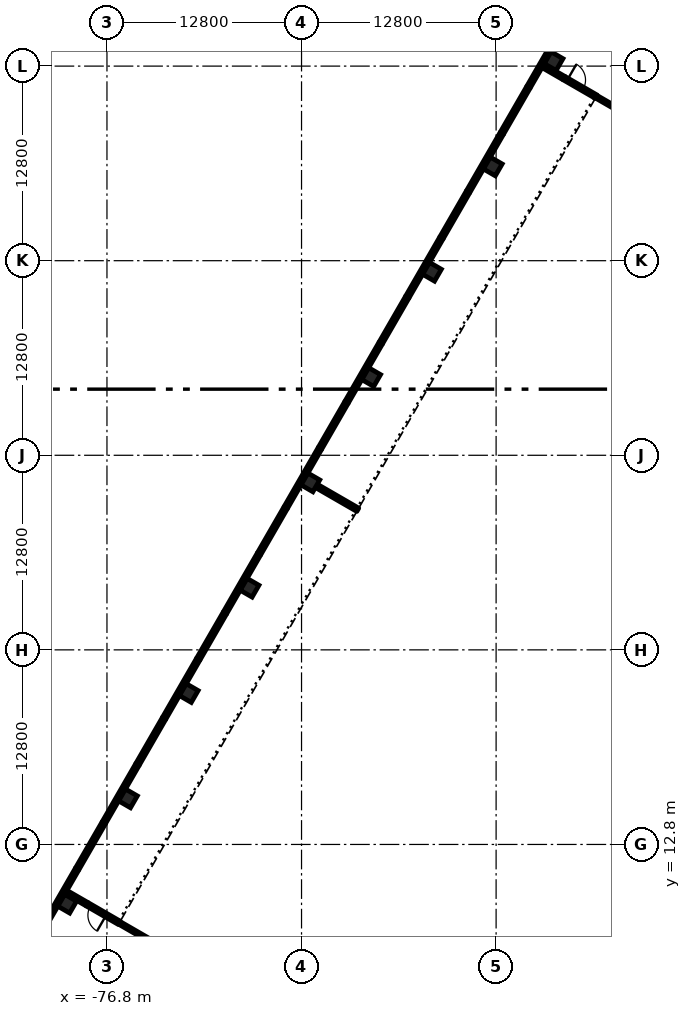
"""IFC4 building model, lengths in metres.
Left out: names, types, materials, properties, quantities, classifications, styles, units other than length and angle.
Written with IfcOpenShell. Run it as: python <this file> out.ifc"""

import sys

from ifc_helpers import new_model, si_unit, direction, frame, frame_2d, origin, origin_2d, place, context, subcontext, project, spatial, rectangle, extrude, element, fill, save


model = new_model("IFC4")
c1 = context("Model", 3, precision=1e-05, world=origin(), true_north=direction((0.0, 1.0)))
c2 = subcontext(c1, "Body", "Model", "MODEL_VIEW")
j1 = project(units=[si_unit("LENGTHUNIT", "METRE"), si_unit("PLANEANGLEUNIT", "RADIAN")], contexts=[c1])
p1 = place(None, origin())
s1 = spatial("IfcSite", under=j1, at=p1, CompositionType="ELEMENT")
p2 = place(p1, origin())
s2 = spatial("IfcBuilding", under=s1, at=p2, CompositionType="ELEMENT")
p3 = place(p2, frame((0.0, 0.0, 11.4)))
s3 = spatial("IfcBuildingStorey", under=s2, at=p3, CompositionType="ELEMENT", Elevation=11.4)
for number, where, z_axis, x_axis in (
    (1, (-47.417, 64.327, 0.0), (0.0, 0.0, 1.0), (-0.5, -0.866, 0.0)),
    (2, (-51.417, 57.399, 0.0), (0.0, 0.0, 1.0), (-0.5, -0.866, 0.0)),
    (3, (-55.417, 50.47, 0.0), (0.0, 0.0, 1.0), (-0.5, -0.866, 0.0)),
    (4, (-59.417, 43.542, 0.0), (0.0, 0.0, 1.0), (-0.5, -0.866, 0.0)),
    (5, (-63.417, 36.614, 0.0), (0.0, 0.0, 1.0), (-0.5, -0.866, 0.0)),
    (6, (-67.417, 29.686, 0.0), (0.0, 0.0, 1.0), (-0.5, -0.866, 0.0)),
    (7, (-71.417, 22.758, 0.0), (0.0, 0.0, 1.0), (-0.5, -0.866, 0.0)),
    (8, (-75.417, 15.829, 0.0), (0.0, 0.0, 1.0), (-0.5, -0.866, 0.0)),
    (9, (-79.417, 8.901, 0.0), (0.0, 0.0, 1.0), (-0.5, -0.866, 0.0)),
):
    element("IfcColumn", number, at=place(p3, frame(where, z_axis=z_axis, x_axis=x_axis)), inside=s3, PredefinedType="COLUMN", context=c2, shape_type="SweptSolid", body=[
        extrude(rectangle(XDim=0.9, YDim=0.9, at=origin_2d()), origin(), (0.0, 0.0, 1.0), 4.8),
    ])
p4 = place(p3, frame((-49.071, 62.612, 0.0), z_axis=(0.0, 0.0, 1.0), x_axis=(0.500001855621, 0.866024332438, 0.0)))
e10 = element("IfcWall", 10, at=p4, inside=s3, PredefinedType="SOLIDWALL", context=c2, shape_type="SweptSolid", body=[
    extrude(rectangle(XDim=10.312, YDim=0.25, at=frame_2d((5.156, 0.0))), origin(), (0.0, 0.0, 1.0), 4.5),
])
p5 = place(p3, frame((-50.821, 59.581, 0.0), z_axis=(0.0, 0.0, 1.0), x_axis=(0.500010275428, 0.866019471182, 0.0)))
e11 = element("IfcWall", 11, at=p5, inside=s3, PredefinedType="SOLIDWALL", context=c2, shape_type="SweptSolid", body=[
    extrude(rectangle(XDim=3.5, YDim=0.25, at=frame_2d((1.75, 0.0))), origin(), (0.0, 0.0, 1.0), 4.5),
])
p6 = place(p5, frame((0.25, 0.0, 0.9)))
e12 = element("IfcOpeningElement", 12, at=p6, cuts=e11, PredefinedType="OPENING", context=c2, shape_type="SweptSolid", body=[
    extrude(rectangle(XDim=3.0, YDim=2.2, at=frame_2d((1.5, 1.1))), frame((0.0, 0.135, 0.0), z_axis=(0.0, -1.0, 0.0), x_axis=(1.0, 0.0, 0.0)), (0.0, 0.0, 1.0), 0.27),
])
p7 = place(p3, frame((-53.04, 55.738, 0.0), z_axis=(0.0, 0.0, 1.0), x_axis=(0.499990705068, 0.866030770149, 0.0)))
e13 = element("IfcWall", 13, at=p7, inside=s3, PredefinedType="SOLIDWALL", context=c2, shape_type="SweptSolid", body=[
    extrude(rectangle(XDim=4.438, YDim=0.25, at=frame_2d((2.219, 0.0))), origin(), (0.0, 0.0, 1.0), 4.5),
])
p8 = place(p3, frame((-54.79, 52.706, 0.0), z_axis=(0.0, 0.0, 1.0), x_axis=(0.499980071345, 0.866036909293, 0.0)))
e14 = element("IfcWall", 14, at=p8, inside=s3, PredefinedType="SOLIDWALL", context=c2, shape_type="SweptSolid", body=[
    extrude(rectangle(XDim=3.5, YDim=0.25, at=frame_2d((1.75, 0.0))), origin(), (0.0, 0.0, 1.0), 4.5),
])
p9 = place(p8, frame((0.25, 0.0, 0.9)))
e15 = element("IfcOpeningElement", 15, at=p9, cuts=e14, PredefinedType="OPENING", context=c2, shape_type="SweptSolid", body=[
    extrude(rectangle(XDim=3.0, YDim=2.2, at=frame_2d((1.5, 1.1))), frame((0.0, 0.135, 0.0), z_axis=(0.0, -1.0, 0.0), x_axis=(1.0, 0.0, 0.0)), (0.0, 0.0, 1.0), 0.27),
])
p10 = place(p3, frame((-57.04, 48.809, 0.0), z_axis=(0.0, 0.0, 1.0), x_axis=(0.500013631625, 0.866017533419, 0.0)))
e16 = element("IfcWall", 16, at=p10, inside=s3, PredefinedType="SOLIDWALL", context=c2, shape_type="SweptSolid", body=[
    extrude(rectangle(XDim=4.5, YDim=0.25, at=frame_2d((2.25, 0.0))), origin(), (0.0, 0.0, 1.0), 4.5),
])
p11 = place(p3, frame((-58.79, 45.778, 0.0), z_axis=(0.0, 0.0, 1.0), x_axis=(0.500010275428, 0.866019471182, 0.0)))
e17 = element("IfcWall", 17, at=p11, inside=s3, PredefinedType="SOLIDWALL", context=c2, shape_type="SweptSolid", body=[
    extrude(rectangle(XDim=3.5, YDim=0.25, at=frame_2d((1.75, 0.0))), origin(), (0.0, 0.0, 1.0), 4.5),
])
p12 = place(p11, frame((0.25, 0.0, 0.9)))
e18 = element("IfcOpeningElement", 18, at=p12, cuts=e17, PredefinedType="OPENING", context=c2, shape_type="SweptSolid", body=[
    extrude(rectangle(XDim=3.0, YDim=2.2, at=frame_2d((1.5, 1.1))), frame((0.0, 0.135, 0.0), z_axis=(0.0, -1.0, 0.0), x_axis=(1.0, 0.0, 0.0)), (0.0, 0.0, 1.0), 0.27),
])
p13 = place(p3, frame((-61.04, 41.881, 0.0), z_axis=(0.0, 0.0, 1.0), x_axis=(0.499990139034, 0.866031096941, 0.0)))
e19 = element("IfcWall", 19, at=p13, inside=s3, PredefinedType="SOLIDWALL", context=c2, shape_type="SweptSolid", body=[
    extrude(rectangle(XDim=4.5, YDim=0.25, at=frame_2d((2.25, 0.0))), origin(), (0.0, 0.0, 1.0), 4.5),
])
p14 = place(p3, frame((-62.79, 38.85, 0.0), z_axis=(0.0, 0.0, 1.0), x_axis=(0.500010275428, 0.866019471182, 0.0)))
e20 = element("IfcWall", 20, at=p14, inside=s3, PredefinedType="SOLIDWALL", context=c2, shape_type="SweptSolid", body=[
    extrude(rectangle(XDim=3.5, YDim=0.25, at=frame_2d((1.75, 0.0))), origin(), (0.0, 0.0, 1.0), 4.5),
])
p15 = place(p14, frame((0.25, 0.0, 0.9)))
e21 = element("IfcOpeningElement", 21, at=p15, cuts=e20, PredefinedType="OPENING", context=c2, shape_type="SweptSolid", body=[
    extrude(rectangle(XDim=3.0, YDim=2.2, at=frame_2d((1.5, 1.1))), frame((0.0, 0.135, 0.0), z_axis=(0.0, -1.0, 0.0), x_axis=(1.0, 0.0, 0.0)), (0.0, 0.0, 1.0), 0.27),
])
p16 = place(p3, frame((-65.04, 34.953, 0.0), z_axis=(0.0, 0.0, 1.0), x_axis=(0.499990139034, 0.866031096941, 0.0)))
e22 = element("IfcWall", 22, at=p16, inside=s3, PredefinedType="SOLIDWALL", context=c2, shape_type="SweptSolid", body=[
    extrude(rectangle(XDim=4.5, YDim=0.25, at=frame_2d((2.25, 0.0))), origin(), (0.0, 0.0, 1.0), 4.5),
])
p17 = place(p3, frame((-66.79, 31.922, 0.0), z_axis=(0.0, 0.0, 1.0), x_axis=(0.500010275428, 0.866019471182, 0.0)))
e23 = element("IfcWall", 23, at=p17, inside=s3, PredefinedType="SOLIDWALL", context=c2, shape_type="SweptSolid", body=[
    extrude(rectangle(XDim=3.5, YDim=0.25, at=frame_2d((1.75, 0.0))), origin(), (0.0, 0.0, 1.0), 4.5),
])
p18 = place(p17, frame((0.25, 0.0, 0.9)))
e24 = element("IfcOpeningElement", 24, at=p18, cuts=e23, PredefinedType="OPENING", context=c2, shape_type="SweptSolid", body=[
    extrude(rectangle(XDim=3.0, YDim=2.2, at=frame_2d((1.5, 1.1))), frame((0.0, 0.135, 0.0), z_axis=(0.0, -1.0, 0.0), x_axis=(1.0, 0.0, 0.0)), (0.0, 0.0, 1.0), 0.27),
])
p19 = place(p3, frame((-69.04, 28.025, 0.0), z_axis=(0.0, 0.0, 1.0), x_axis=(0.499990139034, 0.866031096941, 0.0)))
e25 = element("IfcWall", 25, at=p19, inside=s3, PredefinedType="SOLIDWALL", context=c2, shape_type="SweptSolid", body=[
    extrude(rectangle(XDim=4.5, YDim=0.25, at=frame_2d((2.25, 0.0))), origin(), (0.0, 0.0, 1.0), 4.5),
])
p20 = place(p3, frame((-70.79, 24.994, 0.0), z_axis=(0.0, 0.0, 1.0), x_axis=(0.500010275428, 0.866019471182, 0.0)))
e26 = element("IfcWall", 26, at=p20, inside=s3, PredefinedType="SOLIDWALL", context=c2, shape_type="SweptSolid", body=[
    extrude(rectangle(XDim=3.5, YDim=0.25, at=frame_2d((1.75, 0.0))), origin(), (0.0, 0.0, 1.0), 4.5),
])
p21 = place(p20, frame((0.25, 0.0, 0.9)))
e27 = element("IfcOpeningElement", 27, at=p21, cuts=e26, PredefinedType="OPENING", context=c2, shape_type="SweptSolid", body=[
    extrude(rectangle(XDim=3.0, YDim=2.2, at=frame_2d((1.5, 1.1))), frame((0.0, 0.135, 0.0), z_axis=(0.0, -1.0, 0.0), x_axis=(1.0, 0.0, 0.0)), (0.0, 0.0, 1.0), 0.27),
])
p22 = place(p3, frame((-73.04, 21.096, 0.0), z_axis=(0.0, 0.0, 1.0), x_axis=(0.499990139034, 0.866031096941, 0.0)))
e28 = element("IfcWall", 28, at=p22, inside=s3, PredefinedType="SOLIDWALL", context=c2, shape_type="SweptSolid", body=[
    extrude(rectangle(XDim=4.5, YDim=0.25, at=frame_2d((2.25, 0.0))), origin(), (0.0, 0.0, 1.0), 4.5),
])
p23 = place(p3, frame((-74.79, 18.065, 0.0), z_axis=(0.0, 0.0, 1.0), x_axis=(0.500010275428, 0.866019471182, 0.0)))
e29 = element("IfcWall", 29, at=p23, inside=s3, PredefinedType="SOLIDWALL", context=c2, shape_type="SweptSolid", body=[
    extrude(rectangle(XDim=3.5, YDim=0.25, at=frame_2d((1.75, 0.0))), origin(), (0.0, 0.0, 1.0), 4.5),
])
p24 = place(p23, frame((0.25, 0.0, 0.9)))
e30 = element("IfcOpeningElement", 30, at=p24, cuts=e29, PredefinedType="OPENING", context=c2, shape_type="SweptSolid", body=[
    extrude(rectangle(XDim=3.0, YDim=2.2, at=frame_2d((1.5, 1.1))), frame((0.0, 0.135, 0.0), z_axis=(0.0, -1.0, 0.0), x_axis=(1.0, 0.0, 0.0)), (0.0, 0.0, 1.0), 0.27),
])
p25 = place(p3, frame((-77.009, 14.222, 0.0), z_axis=(0.0, 0.0, 1.0), x_axis=(0.499990705068, 0.866030770149, 0.0)))
e31 = element("IfcWall", 31, at=p25, inside=s3, PredefinedType="SOLIDWALL", context=c2, shape_type="SweptSolid", body=[
    extrude(rectangle(XDim=4.438, YDim=0.25, at=frame_2d((2.219, 0.0))), origin(), (0.0, 0.0, 1.0), 4.5),
])
p26 = place(p3, frame((-78.759, 11.191, 0.0), z_axis=(0.0, 0.0, 1.0), x_axis=(0.500010275428, 0.866019471182, 0.0)))
e32 = element("IfcWall", 32, at=p26, inside=s3, PredefinedType="SOLIDWALL", context=c2, shape_type="SweptSolid", body=[
    extrude(rectangle(XDim=3.5, YDim=0.25, at=frame_2d((1.75, 0.0))), origin(), (0.0, 0.0, 1.0), 4.5),
])
p27 = place(p26, frame((0.25, 0.0, 0.9)))
e33 = element("IfcOpeningElement", 33, at=p27, cuts=e32, PredefinedType="OPENING", context=c2, shape_type="SweptSolid", body=[
    extrude(rectangle(XDim=3.0, YDim=2.2, at=frame_2d((1.5, 1.1))), frame((0.0, 0.135, 0.0), z_axis=(0.0, -1.0, 0.0), x_axis=(1.0, 0.0, 0.0)), (0.0, 0.0, 1.0), 0.27),
])
p28 = place(p3, frame((-83.915, 2.26, 0.0), z_axis=(0.0, 0.0, 1.0), x_axis=(0.500001855621, 0.866024332438, 0.0)))
e34 = element("IfcWall", 34, at=p28, inside=s3, PredefinedType="SOLIDWALL", context=c2, shape_type="SweptSolid", body=[
    extrude(rectangle(XDim=10.312, YDim=0.25, at=frame_2d((5.156, 0.0))), origin(), (0.0, 0.0, 1.0), 4.5),
])
p29 = place(p3, frame((-46.734, 63.21, 0.0), z_axis=(0.0, 0.0, 1.0), x_axis=(0.866057815567, -0.499943856944, 0.0)))
e35 = element("IfcWall", 35, at=p29, inside=s3, PredefinedType="SOLIDWALL", context=c2, shape_type="SweptSolid", body=[
    extrude(rectangle(XDim=2.45, YDim=0.25, at=frame_2d((1.225, 0.0))), origin(), (0.0, 0.0, 1.0), 3.9),
])
p30 = place(p29, frame((0.25, 0.0, 0.0)))
e36 = element("IfcOpeningElement", 36, at=p30, cuts=e35, PredefinedType="OPENING", context=c2, shape_type="SweptSolid", body=[
    extrude(rectangle(XDim=1.2, YDim=2.1, at=frame_2d((0.6, 1.05))), frame((0.0, 0.135, 0.0), z_axis=(0.0, -1.0, 0.0), x_axis=(1.0, 0.0, 0.0)), (0.0, 0.0, 1.0), 0.27),
])
p31 = place(p3, frame((-46.734, 63.21, 0.0), z_axis=(0.0, 0.0, 1.0), x_axis=(-0.865989903783, 0.500061482766, 0.0)))
e37 = element("IfcWall", 37, at=p31, inside=s3, PredefinedType="SOLIDWALL", context=c2, shape_type="SweptSolid", body=[
    extrude(rectangle(XDim=1.6, YDim=0.25, at=frame_2d((0.8, 0.0))), origin(), (0.0, 0.0, 1.0), 3.9),
])
p32 = place(p3, frame((-60.3, 34.814, 0.0), z_axis=(0.0, 0.0, 1.0), x_axis=(-0.866035871367, 0.499981869177, 0.0)))
e38 = element("IfcWall", 38, at=p32, inside=s3, PredefinedType="SOLIDWALL", context=c2, shape_type="SweptSolid", body=[
    extrude(rectangle(XDim=3.15, YDim=0.25, at=frame_2d((1.575, 0.0))), origin(), (0.0, 0.0, 1.0), 3.9),
])
p33 = place(p3, frame((-75.987, 7.642, 0.0), z_axis=(0.0, 0.0, 1.0), x_axis=(-0.866014668023, 0.500018594424, 0.0)))
e39 = element("IfcWall", 39, at=p33, inside=s3, PredefinedType="SOLIDWALL", context=c2, shape_type="SweptSolid", body=[
    extrude(rectangle(XDim=2.45, YDim=0.25, at=frame_2d((1.225, 0.0))), origin(), (0.0, 0.0, 1.0), 3.9),
])
p34 = place(p33, frame((1.0, 0.0, 0.0)))
e40 = element("IfcOpeningElement", 40, at=p34, cuts=e39, PredefinedType="OPENING", context=c2, shape_type="SweptSolid", body=[
    extrude(rectangle(XDim=1.2, YDim=2.1, at=frame_2d((0.6, 1.05))), frame((0.0, 0.135, 0.0), z_axis=(0.0, -1.0, 0.0), x_axis=(1.0, 0.0, 0.0)), (0.0, 0.0, 1.0), 0.27),
])
p35 = place(p3, frame((-78.109, 8.867, 0.0), z_axis=(0.0, 0.0, 1.0), x_axis=(-0.865989903783, 0.500061482766, 0.0)))
e41 = element("IfcWall", 41, at=p35, inside=s3, PredefinedType="SOLIDWALL", context=c2, shape_type="SweptSolid", body=[
    extrude(rectangle(XDim=1.6, YDim=0.25, at=frame_2d((0.8, 0.0))), origin(), (0.0, 0.0, 1.0), 3.9),
])
p36 = place(p3, frame((-10.491, 42.285, 0.0), z_axis=(0.0, 0.0, 1.0), x_axis=(-0.866022857395, 0.50000441045, 0.0)))
e42 = element("IfcWall", 42, at=p36, inside=s3, PredefinedType="PARTITIONING", context=c2, shape_type="SweptSolid", body=[
    extrude(rectangle(XDim=39.4, YDim=0.2, at=frame_2d((19.7, 0.0))), origin(), (0.0, 0.0, 1.0), 3.9),
])
p37 = place(p3, frame((-41.866, -12.058, 0.0), z_axis=(0.0, 0.0, 1.0), x_axis=(-0.866025540551, 0.499999763114, 0.0)))
e43 = element("IfcWall", 43, at=p37, inside=s3, PredefinedType="PARTITIONING", context=c2, shape_type="SweptSolid", body=[
    extrude(rectangle(XDim=39.4, YDim=0.2, at=frame_2d((19.7, 0.0))), origin(), (0.0, 0.0, 1.0), 3.9),
])
p38 = place(p6, origin())
e44 = element("IfcWindow", 44, at=p38, inside=s3, PartitioningType="SINGLE_PANEL", PredefinedType="WINDOW", context=c2, shape_type="SweptSolid", body=[
    extrude(rectangle(XDim=3.0, YDim=2.2, at=frame_2d((1.5, 1.1))), frame((0.0, 0.03, 0.0), z_axis=(0.0, -1.0, 0.0), x_axis=(1.0, 0.0, 0.0)), (0.0, 0.0, 1.0), 0.06),
])
fill(e12, e44)
p39 = place(p9, origin())
e45 = element("IfcWindow", 45, at=p39, inside=s3, PartitioningType="SINGLE_PANEL", PredefinedType="WINDOW", context=c2, shape_type="SweptSolid", body=[
    extrude(rectangle(XDim=3.0, YDim=2.2, at=frame_2d((1.5, 1.1))), frame((0.0, 0.03, 0.0), z_axis=(0.0, -1.0, 0.0), x_axis=(1.0, 0.0, 0.0)), (0.0, 0.0, 1.0), 0.06),
])
fill(e15, e45)
p40 = place(p12, origin())
e46 = element("IfcWindow", 46, at=p40, inside=s3, PartitioningType="SINGLE_PANEL", PredefinedType="WINDOW", context=c2, shape_type="SweptSolid", body=[
    extrude(rectangle(XDim=3.0, YDim=2.2, at=frame_2d((1.5, 1.1))), frame((0.0, 0.03, 0.0), z_axis=(0.0, -1.0, 0.0), x_axis=(1.0, 0.0, 0.0)), (0.0, 0.0, 1.0), 0.06),
])
fill(e18, e46)
p41 = place(p15, origin())
e47 = element("IfcWindow", 47, at=p41, inside=s3, PartitioningType="SINGLE_PANEL", PredefinedType="WINDOW", context=c2, shape_type="SweptSolid", body=[
    extrude(rectangle(XDim=3.0, YDim=2.2, at=frame_2d((1.5, 1.1))), frame((0.0, 0.03, 0.0), z_axis=(0.0, -1.0, 0.0), x_axis=(1.0, 0.0, 0.0)), (0.0, 0.0, 1.0), 0.06),
])
fill(e21, e47)
p42 = place(p18, origin())
e48 = element("IfcWindow", 48, at=p42, inside=s3, PartitioningType="SINGLE_PANEL", PredefinedType="WINDOW", context=c2, shape_type="SweptSolid", body=[
    extrude(rectangle(XDim=3.0, YDim=2.2, at=frame_2d((1.5, 1.1))), frame((0.0, 0.03, 0.0), z_axis=(0.0, -1.0, 0.0), x_axis=(1.0, 0.0, 0.0)), (0.0, 0.0, 1.0), 0.06),
])
fill(e24, e48)
p43 = place(p21, origin())
e49 = element("IfcWindow", 49, at=p43, inside=s3, PartitioningType="SINGLE_PANEL", PredefinedType="WINDOW", context=c2, shape_type="SweptSolid", body=[
    extrude(rectangle(XDim=3.0, YDim=2.2, at=frame_2d((1.5, 1.1))), frame((0.0, 0.03, 0.0), z_axis=(0.0, -1.0, 0.0), x_axis=(1.0, 0.0, 0.0)), (0.0, 0.0, 1.0), 0.06),
])
fill(e27, e49)
p44 = place(p24, origin())
e50 = element("IfcWindow", 50, at=p44, inside=s3, PartitioningType="SINGLE_PANEL", PredefinedType="WINDOW", context=c2, shape_type="SweptSolid", body=[
    extrude(rectangle(XDim=3.0, YDim=2.2, at=frame_2d((1.5, 1.1))), frame((0.0, 0.03, 0.0), z_axis=(0.0, -1.0, 0.0), x_axis=(1.0, 0.0, 0.0)), (0.0, 0.0, 1.0), 0.06),
])
fill(e30, e50)
p45 = place(p27, origin())
e51 = element("IfcWindow", 51, at=p45, inside=s3, PartitioningType="SINGLE_PANEL", PredefinedType="WINDOW", context=c2, shape_type="SweptSolid", body=[
    extrude(rectangle(XDim=3.0, YDim=2.2, at=frame_2d((1.5, 1.1))), frame((0.0, 0.03, 0.0), z_axis=(0.0, -1.0, 0.0), x_axis=(1.0, 0.0, 0.0)), (0.0, 0.0, 1.0), 0.06),
])
fill(e33, e51)
p46 = place(p30, origin())
e52 = element("IfcDoor", 52, at=p46, inside=s3, OperationType="SINGLE_SWING_LEFT", PredefinedType="DOOR", context=c2, shape_type="SweptSolid", body=[
    extrude(rectangle(XDim=1.2, YDim=2.1, at=frame_2d((0.6, 1.05))), frame((0.0, 0.025, 0.0), z_axis=(0.0, -1.0, 0.0), x_axis=(1.0, 0.0, 0.0)), (0.0, 0.0, 1.0), 0.05),
])
fill(e36, e52)
p47 = place(p34, origin())
e53 = element("IfcDoor", 53, at=p47, inside=s3, OperationType="SINGLE_SWING_LEFT", PredefinedType="DOOR", context=c2, shape_type="SweptSolid", body=[
    extrude(rectangle(XDim=1.2, YDim=2.1, at=frame_2d((0.6, 1.05))), frame((0.0, 0.025, 0.0), z_axis=(0.0, -1.0, 0.0), x_axis=(1.0, 0.0, 0.0)), (0.0, 0.0, 1.0), 0.05),
])
fill(e40, e53)
save(model, sys.argv[1])
